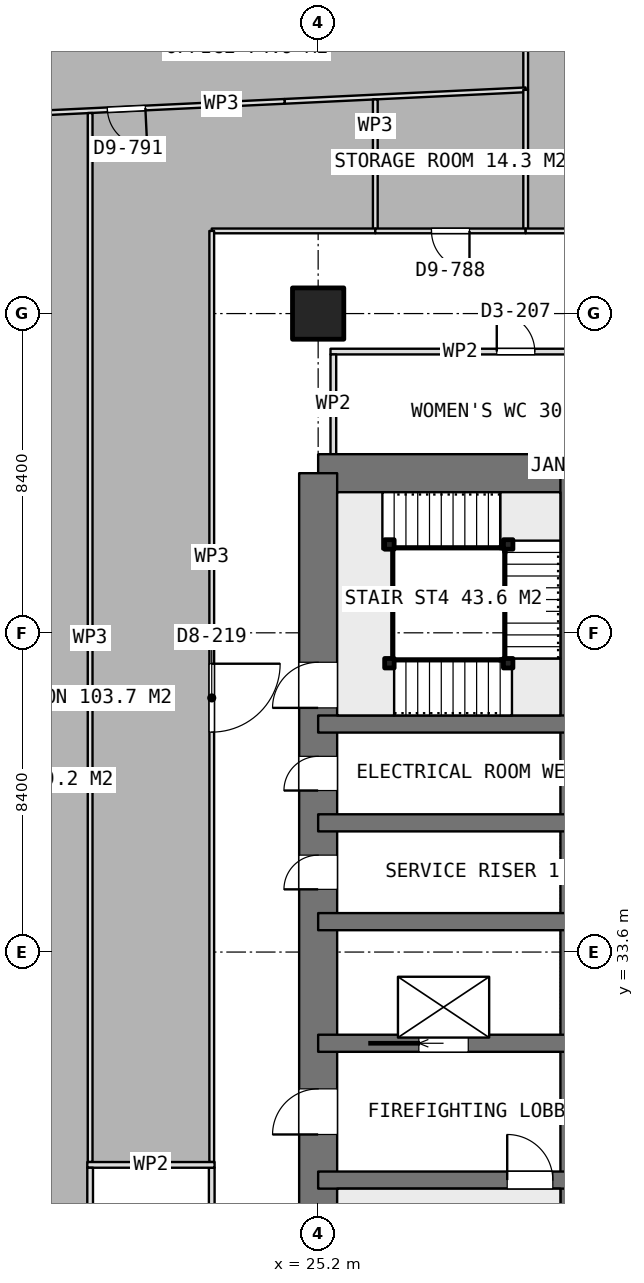
"""IFC4 building model, lengths in metres.
Left out: names, types, materials, properties, quantities, classifications, styles, units other than length and angle.
Written with IfcOpenShell. Run it as: python <this file> out.ifc"""

import sys

from ifc_helpers import new_model, si_unit, direction, frame, frame_2d, origin, origin_2d, place, context, subcontext, project, spatial, rectangle, extrude, element, fill, save


model = new_model("IFC4")
c1 = context("Model", 3, precision=1e-05, world=origin(), true_north=direction((0.0, 1.0)))
c2 = subcontext(c1, "Body", "Model", "MODEL_VIEW")
j1 = project(units=[si_unit("LENGTHUNIT", "METRE"), si_unit("PLANEANGLEUNIT", "RADIAN")], contexts=[c1])
p1 = place(None, origin())
s1 = spatial("IfcSite", under=j1, at=p1, CompositionType="ELEMENT")
p2 = place(p1, origin())
s2 = spatial("IfcBuilding", under=s1, at=p2, CompositionType="ELEMENT")
p3 = place(p2, frame((0.0, 0.0, 195.2)))
s3 = spatial("IfcBuildingStorey", under=s2, at=p3, CompositionType="ELEMENT", Elevation=195.2)
p4 = place(p3, frame((25.2, 46.2, 0.0), z_axis=(0.0, 0.0, 1.0), x_axis=(1.0, 0.0, 0.0)))
e1 = element("IfcWall", 1, at=p4, inside=s3, PredefinedType="SHEAR", context=c2, shape_type="SweptSolid", body=[
    extrude(rectangle(XDim=10.4, YDim=1.0, at=frame_2d((5.2, 0.0))), origin(), (0.0, 0.0, 1.0), 3.75),
])
p5 = place(p3, frame((25.2, 21.0, 0.0), z_axis=(0.0, 0.0, 1.0), x_axis=(0.0, 1.0, 0.0)))
e2 = element("IfcWall", 2, at=p5, inside=s3, PredefinedType="SHEAR", context=c2, shape_type="SweptSolid", body=[
    extrude(rectangle(XDim=25.2, YDim=1.0, at=frame_2d((12.6, 0.0))), origin(), (0.0, 0.0, 1.0), 3.75),
])
p6 = place(p5, frame((7.8, 0.0, 0.0)))
e3 = element("IfcOpeningElement", 3, at=p6, cuts=e2, PredefinedType="OPENING", context=c2, shape_type="SweptSolid", body=[
    extrude(rectangle(XDim=1.2, YDim=2.1, at=frame_2d((0.6, 1.05))), frame((0.0, 0.51, 0.0), z_axis=(0.0, -1.0, 0.0), x_axis=(1.0, 0.0, 0.0)), (0.0, 0.0, 1.0), 1.02),
])
p7 = place(p5, frame((14.25, 0.0, 0.0)))
e4 = element("IfcOpeningElement", 4, at=p7, cuts=e2, PredefinedType="OPENING", context=c2, shape_type="SweptSolid", body=[
    extrude(rectangle(XDim=0.9, YDim=2.1, at=frame_2d((0.45, 1.05))), frame((0.0, 0.51, 0.0), z_axis=(0.0, -1.0, 0.0), x_axis=(1.0, 0.0, 0.0)), (0.0, 0.0, 1.0), 1.02),
])
p8 = place(p5, frame((16.85, 0.0, 0.0)))
e5 = element("IfcOpeningElement", 5, at=p8, cuts=e2, PredefinedType="OPENING", context=c2, shape_type="SweptSolid", body=[
    extrude(rectangle(XDim=0.9, YDim=2.1, at=frame_2d((0.45, 1.05))), frame((0.0, 0.51, 0.0), z_axis=(0.0, -1.0, 0.0), x_axis=(1.0, 0.0, 0.0)), (0.0, 0.0, 1.0), 1.02),
])
p9 = place(p5, frame((19.025, 0.0, 0.0)))
e6 = element("IfcOpeningElement", 6, at=p9, cuts=e2, PredefinedType="OPENING", context=c2, shape_type="SweptSolid", body=[
    extrude(rectangle(XDim=1.2, YDim=2.1, at=frame_2d((0.6, 1.05))), frame((0.0, 0.51, 0.0), z_axis=(0.0, -1.0, 0.0), x_axis=(1.0, 0.0, 0.0)), (0.0, 0.0, 1.0), 1.02),
])
p10 = place(p3, frame((31.8, 21.0, 0.0), z_axis=(0.0, 0.0, 1.0), x_axis=(0.0, 1.0, 0.0)))
e7 = element("IfcWall", 7, at=p10, inside=s3, PredefinedType="SHEAR", context=c2, shape_type="SweptSolid", body=[
    extrude(rectangle(XDim=25.2, YDim=0.45, at=frame_2d((12.6, 0.0))), origin(), (0.0, 0.0, 1.0), 3.75),
])
p11 = place(p3, frame((25.2, 27.6, 0.0), z_axis=(0.0, 0.0, 1.0), x_axis=(1.0, 0.0, 0.0)))
e8 = element("IfcWall", 8, at=p11, inside=s3, PredefinedType="SHEAR", context=c2, shape_type="SweptSolid", body=[
    extrude(rectangle(XDim=6.6, YDim=0.45, at=frame_2d((3.3, 0.0))), origin(), (0.0, 0.0, 1.0), 3.75),
])
p12 = place(p11, frame((4.975, 0.0, 0.0)))
e9 = element("IfcOpeningElement", 9, at=p12, cuts=e8, PredefinedType="OPENING", context=c2, shape_type="SweptSolid", body=[
    extrude(rectangle(XDim=1.2, YDim=2.1, at=frame_2d((0.6, 1.05))), frame((0.0, 0.235, 0.0), z_axis=(0.0, -1.0, 0.0), x_axis=(1.0, 0.0, 0.0)), (0.0, 0.0, 1.0), 0.47),
])
p13 = place(p3, frame((25.2, 31.2, 0.0), z_axis=(0.0, 0.0, 1.0), x_axis=(1.0, 0.0, 0.0)))
e10 = element("IfcWall", 10, at=p13, inside=s3, PredefinedType="SHEAR", context=c2, shape_type="SweptSolid", body=[
    extrude(rectangle(XDim=6.6, YDim=0.45, at=frame_2d((3.3, 0.0))), origin(), (0.0, 0.0, 1.0), 3.75),
])
p14 = place(p13, frame((2.65, 0.0, 0.0)))
e11 = element("IfcOpeningElement", 11, at=p14, cuts=e10, PredefinedType="OPENING", context=c2, shape_type="SweptSolid", body=[
    extrude(rectangle(XDim=1.3, YDim=2.1, at=frame_2d((0.65, 1.05))), frame((0.0, 0.235, 0.0), z_axis=(0.0, -1.0, 0.0), x_axis=(1.0, 0.0, 0.0)), (0.0, 0.0, 1.0), 0.47),
])
for number, where, z_axis, x_axis in (
    (12, (25.2, 34.4, 0.0), (0.0, 0.0, 1.0), (1.0, 0.0, 0.0)),
    (13, (25.2, 37.0, 0.0), (0.0, 0.0, 1.0), (1.0, 0.0, 0.0)),
    (14, (25.2, 39.6, 0.0), (0.0, 0.0, 1.0), (1.0, 0.0, 0.0)),
):
    element("IfcWall", number, at=place(p3, frame(where, z_axis=z_axis, x_axis=x_axis)), inside=s3, PredefinedType="SHEAR", context=c2, shape_type="SweptSolid", body=[
        extrude(rectangle(XDim=6.6, YDim=0.45, at=frame_2d((3.3, 0.0))), origin(), (0.0, 0.0, 1.0), 3.75),
    ])
p15 = place(p3, frame((25.2, 50.4, 0.0), z_axis=(0.0, 0.0, 1.0), x_axis=(1.0, 0.0, 0.0)))
e15 = element("IfcColumn", 15, at=p15, inside=s3, PredefinedType="COLUMN", context=c2, shape_type="SweptSolid", body=[
    extrude(rectangle(XDim=1.35, YDim=1.35, at=origin_2d()), origin(), (0.0, 0.0, 1.0), 3.75),
])
p16 = place(p3, frame((25.525, 49.4, 0.0), z_axis=(0.0, 0.0, 1.0), x_axis=(1.0, 0.0, 0.0)))
e16 = element("IfcWall", 16, at=p16, inside=s3, PredefinedType="PARTITIONING", context=c2, shape_type="SweptSolid", body=[
    extrude(rectangle(XDim=9.75, YDim=0.15, at=frame_2d((4.875, 0.0))), origin(), (0.0, 0.0, 1.0), 3.5),
])
p17 = place(p16, frame((4.375, 0.0, 0.0)))
e17 = element("IfcOpeningElement", 17, at=p17, cuts=e16, PredefinedType="OPENING", context=c2, shape_type="SweptSolid", body=[
    extrude(rectangle(XDim=1.0, YDim=2.1, at=frame_2d((0.5, 1.05))), frame((0.0, 0.085, 0.0), z_axis=(0.0, -1.0, 0.0), x_axis=(1.0, 0.0, 0.0)), (0.0, 0.0, 1.0), 0.17),
])
p18 = place(p3, frame((25.6, 46.7, 0.0), z_axis=(0.0, 0.0, 1.0), x_axis=(0.0, 1.0, 0.0)))
e18 = element("IfcWall", 18, at=p18, inside=s3, PredefinedType="PARTITIONING", context=c2, shape_type="SweptSolid", body=[
    extrude(rectangle(XDim=2.625, YDim=0.15, at=frame_2d((1.312, 0.0))), origin(), (0.0, 0.0, 1.0), 3.5),
])
p19 = place(p3, frame((19.125, 28.0, 0.0), z_axis=(0.0, 0.0, 1.0), x_axis=(1.0, 0.0, 0.0)))
e19 = element("IfcWall", 19, at=p19, inside=s3, PredefinedType="PARTITIONING", context=c2, shape_type="SweptSolid", body=[
    extrude(rectangle(XDim=3.35, YDim=0.15, at=frame_2d((1.675, 0.0))), origin(), (0.0, 0.0, 1.0), 3.5),
])
p20 = place(p3, frame((19.2, 21.075, 0.0), z_axis=(0.0, 0.0, 1.0), x_axis=(0.0, 1.0, 0.0)))
e20 = element("IfcWall", 20, at=p20, inside=s3, PredefinedType="PARTITIONING", context=c2, shape_type="SweptSolid", body=[
    extrude(rectangle(XDim=6.85, YDim=0.15, at=frame_2d((3.425, 0.0))), origin(), (0.0, 0.0, 1.0), 3.5),
])
p21 = place(p3, frame((22.4, 21.075, 0.0), z_axis=(0.0, 0.0, 1.0), x_axis=(0.0, 1.0, 0.0)))
e21 = element("IfcWall", 21, at=p21, inside=s3, PredefinedType="PARTITIONING", context=c2, shape_type="SweptSolid", body=[
    extrude(rectangle(XDim=6.85, YDim=0.15, at=frame_2d((3.425, 0.0))), origin(), (0.0, 0.0, 1.0), 3.5),
])
p22 = place(p21, frame((2.925, 0.0, 0.0)))
e22 = element("IfcOpeningElement", 22, at=p22, cuts=e21, PredefinedType="OPENING", context=c2, shape_type="SweptSolid", body=[
    extrude(rectangle(XDim=1.0, YDim=2.1, at=frame_2d((0.5, 1.05))), frame((0.0, 0.085, 0.0), z_axis=(0.0, -1.0, 0.0), x_axis=(1.0, 0.0, 0.0)), (0.0, 0.0, 1.0), 0.17),
])
p23 = place(p3, frame((30.661, 61.313, 0.0), z_axis=(0.0, 0.0, 1.0), x_axis=(0.0, -1.0, 0.0)))
e23 = element("IfcWall", 23, at=p23, inside=s3, PredefinedType="PARTITIONING", context=c2, shape_type="SweptSolid", body=[
    extrude(rectangle(XDim=5.026, YDim=0.125, at=frame_2d((2.513, 0.0))), origin(), (0.0, 0.0, 1.0), 3.5),
])
p24 = place(p3, frame((30.661, 56.287, 0.0), z_axis=(0.0, 0.0, 1.0), x_axis=(-0.998859247907, -0.047751469819, 0.0)))
e24 = element("IfcWall", 24, at=p24, inside=s3, PredefinedType="PARTITIONING", context=c2, shape_type="SweptSolid", body=[
    extrude(rectangle(XDim=6.35, YDim=0.125, at=frame_2d((3.175, 0.0))), origin(), (0.0, 0.0, 1.0), 3.5),
])
p25 = place(p3, frame((24.317, 55.984, 0.0), z_axis=(0.0, 0.0, 1.0), x_axis=(-0.998859973319, -0.047736293327, 0.0)))
e25 = element("IfcWall", 25, at=p25, inside=s3, PredefinedType="PARTITIONING", context=c2, shape_type="SweptSolid", body=[
    extrude(rectangle(XDim=8.336, YDim=0.125, at=frame_2d((4.168, 0.0))), origin(), (0.0, 0.0, 1.0), 3.5),
])
p26 = place(p25, frame((3.668, 0.0, 0.0)))
e26 = element("IfcOpeningElement", 26, at=p26, cuts=e25, PredefinedType="OPENING", context=c2, shape_type="SweptSolid", body=[
    extrude(rectangle(XDim=1.0, YDim=2.1, at=frame_2d((0.5, 1.05))), frame((0.0, 0.073, 0.0), z_axis=(0.0, -1.0, 0.0), x_axis=(1.0, 0.0, 0.0)), (0.0, 0.0, 1.0), 0.145),
])
p27 = place(p3, frame((26.704, 56.035, 0.0), z_axis=(0.0, 0.0, 1.0), x_axis=(0.0, -1.0, 0.0)))
e27 = element("IfcWall", 27, at=p27, inside=s3, PredefinedType="PARTITIONING", context=c2, shape_type="SweptSolid", body=[
    extrude(rectangle(XDim=3.46, YDim=0.125, at=frame_2d((1.73, 0.0))), origin(), (0.0, 0.0, 1.0), 3.5),
])
p28 = place(p3, frame((26.704, 52.575, 0.0), z_axis=(0.0, 0.0, 1.0), x_axis=(-1.0, 0.0, 0.0)))
e28 = element("IfcWall", 28, at=p28, inside=s3, PredefinedType="PARTITIONING", context=c2, shape_type="SweptSolid", body=[
    extrude(rectangle(XDim=4.304, YDim=0.125, at=frame_2d((2.152, 0.0))), origin(), (0.0, 0.0, 1.0), 3.5),
])
p29 = place(p3, frame((22.4, 52.575, 0.0), z_axis=(0.0, 0.0, 1.0), x_axis=(0.0, -1.0, 0.0)))
e29 = element("IfcWall", 29, at=p29, inside=s3, PredefinedType="PARTITIONING", context=c2, shape_type="SweptSolid", body=[
    extrude(rectangle(XDim=24.5, YDim=0.125, at=frame_2d((12.25, 0.0))), origin(), (0.0, 0.0, 1.0), 3.5),
])
p30 = place(p29, frame((11.388, 0.0, 0.0)))
e30 = element("IfcOpeningElement", 30, at=p30, cuts=e29, PredefinedType="OPENING", context=c2, shape_type="SweptSolid", body=[
    extrude(rectangle(XDim=1.8, YDim=2.1, at=frame_2d((0.9, 1.05))), frame((0.0, 0.073, 0.0), z_axis=(0.0, -1.0, 0.0), x_axis=(1.0, 0.0, 0.0)), (0.0, 0.0, 1.0), 0.145),
])
p31 = place(p3, frame((19.2, 28.075, 0.0), z_axis=(0.0, 0.0, 1.0), x_axis=(0.0, 1.0, 0.0)))
e31 = element("IfcWall", 31, at=p31, inside=s3, PredefinedType="PARTITIONING", context=c2, shape_type="SweptSolid", body=[
    extrude(rectangle(XDim=27.602, YDim=0.125, at=frame_2d((13.801, 0.0))), origin(), (0.0, 0.0, 1.0), 3.5),
])
p32 = place(p3, frame((30.661, 56.287, 0.0), z_axis=(0.0, 0.0, 1.0), x_axis=(0.0, -1.0, 0.0)))
e32 = element("IfcWall", 32, at=p32, inside=s3, PredefinedType="PARTITIONING", context=c2, shape_type="SweptSolid", body=[
    extrude(rectangle(XDim=3.712, YDim=0.125, at=frame_2d((1.856, 0.0))), origin(), (0.0, 0.0, 1.0), 3.5),
])
p33 = place(p3, frame((30.661, 52.575, 0.0), z_axis=(0.0, 0.0, 1.0), x_axis=(-1.0, 0.0, 0.0)))
e33 = element("IfcWall", 33, at=p33, inside=s3, PredefinedType="PARTITIONING", context=c2, shape_type="SweptSolid", body=[
    extrude(rectangle(XDim=3.957, YDim=0.125, at=frame_2d((1.979, 0.0))), origin(), (0.0, 0.0, 1.0), 3.5),
])
p34 = place(p33, frame((1.479, 0.0, 0.0)))
e34 = element("IfcOpeningElement", 34, at=p34, cuts=e33, PredefinedType="OPENING", context=c2, shape_type="SweptSolid", body=[
    extrude(rectangle(XDim=1.0, YDim=2.1, at=frame_2d((0.5, 1.05))), frame((0.0, 0.073, 0.0), z_axis=(0.0, -1.0, 0.0), x_axis=(1.0, 0.0, 0.0)), (0.0, 0.0, 1.0), 0.145),
])
p35 = place(p3, frame((38.57, 52.575, 0.0), z_axis=(0.0, 0.0, 1.0), x_axis=(-1.0, 0.0, 0.0)))
e35 = element("IfcWall", 35, at=p35, inside=s3, PredefinedType="PARTITIONING", context=c2, shape_type="SweptSolid", body=[
    extrude(rectangle(XDim=7.909, YDim=0.125, at=frame_2d((3.955, 0.0))), origin(), (0.0, 0.0, 1.0), 3.5),
])
p36 = place(p35, frame((3.455, 0.0, 0.0)))
e36 = element("IfcOpeningElement", 36, at=p36, cuts=e35, PredefinedType="OPENING", context=c2, shape_type="SweptSolid", body=[
    extrude(rectangle(XDim=1.0, YDim=2.1, at=frame_2d((0.5, 1.05))), frame((0.0, 0.073, 0.0), z_axis=(0.0, -1.0, 0.0), x_axis=(1.0, 0.0, 0.0)), (0.0, 0.0, 1.0), 0.145),
])
for number, where, z_axis, x_axis in (
    (37, (27.075, 41.2, 0.0), (0.0, 0.0, 1.0), (1.0, 0.0, 0.0)),
    (38, (30.2, 41.2, 0.0), (0.0, 0.0, 1.0), (1.0, 0.0, 0.0)),
    (39, (30.2, 44.325, 0.0), (0.0, 0.0, 1.0), (1.0, 0.0, 0.0)),
    (40, (27.075, 44.325, 0.0), (0.0, 0.0, 1.0), (1.0, 0.0, 0.0)),
):
    element("IfcColumn", number, at=place(p3, frame(where, z_axis=z_axis, x_axis=x_axis)), inside=s3, PredefinedType="COLUMN", context=c2, shape_type="SweptSolid", body=[
        extrude(rectangle(XDim=0.25, YDim=0.25, at=origin_2d()), origin(), (0.0, 0.0, 1.0), 3.75),
    ])
p37 = place(p6, origin())
e41 = element("IfcDoor", 41, at=p37, inside=s3, OperationType="SINGLE_SWING_LEFT", PredefinedType="DOOR", context=c2, shape_type="SweptSolid", body=[
    extrude(rectangle(XDim=1.2, YDim=2.1, at=frame_2d((0.6, 1.05))), frame((0.0, 0.025, 0.0), z_axis=(0.0, -1.0, 0.0), x_axis=(1.0, 0.0, 0.0)), (0.0, 0.0, 1.0), 0.05),
])
fill(e3, e41)
p38 = place(p7, origin())
e42 = element("IfcDoor", 42, at=p38, inside=s3, OperationType="SINGLE_SWING_LEFT", PredefinedType="DOOR", context=c2, shape_type="SweptSolid", body=[
    extrude(rectangle(XDim=0.9, YDim=2.1, at=frame_2d((0.45, 1.05))), frame((0.0, 0.025, 0.0), z_axis=(0.0, -1.0, 0.0), x_axis=(1.0, 0.0, 0.0)), (0.0, 0.0, 1.0), 0.05),
])
fill(e4, e42)
p39 = place(p8, origin())
e43 = element("IfcDoor", 43, at=p39, inside=s3, OperationType="SINGLE_SWING_LEFT", PredefinedType="DOOR", context=c2, shape_type="SweptSolid", body=[
    extrude(rectangle(XDim=0.9, YDim=2.1, at=frame_2d((0.45, 1.05))), frame((0.0, 0.025, 0.0), z_axis=(0.0, -1.0, 0.0), x_axis=(1.0, 0.0, 0.0)), (0.0, 0.0, 1.0), 0.05),
])
fill(e5, e43)
p40 = place(p14, origin())
e44 = element("IfcDoor", 44, at=p40, inside=s3, OperationType="SLIDING_TO_LEFT", PredefinedType="USERDEFINED", context=c2, shape_type="SweptSolid", body=[
    extrude(rectangle(XDim=1.3, YDim=2.1, at=frame_2d((0.65, 1.05))), frame((0.0, 0.025, 0.0), z_axis=(0.0, -1.0, 0.0), x_axis=(1.0, 0.0, 0.0)), (0.0, 0.0, 1.0), 0.05),
])
fill(e11, e44)
p41 = place(p17, origin())
e45 = element("IfcDoor", 45, at=p41, inside=s3, OperationType="SINGLE_SWING_LEFT", PredefinedType="DOOR", context=c2, shape_type="SweptSolid", body=[
    extrude(rectangle(XDim=1.0, YDim=2.1, at=frame_2d((0.5, 1.05))), frame((0.0, 0.025, 0.0), z_axis=(0.0, -1.0, 0.0), x_axis=(1.0, 0.0, 0.0)), (0.0, 0.0, 1.0), 0.05),
])
fill(e17, e45)
p42 = place(p30, origin())
e46 = element("IfcDoor", 46, at=p42, inside=s3, OperationType="DOUBLE_DOOR_SINGLE_SWING", PredefinedType="DOOR", context=c2, shape_type="SweptSolid", body=[
    extrude(rectangle(XDim=1.8, YDim=2.1, at=frame_2d((0.9, 1.05))), frame((0.0, 0.025, 0.0), z_axis=(0.0, -1.0, 0.0), x_axis=(1.0, 0.0, 0.0)), (0.0, 0.0, 1.0), 0.05),
])
fill(e30, e46)
p43 = place(p34, origin())
e47 = element("IfcDoor", 47, at=p43, inside=s3, OperationType="SINGLE_SWING_LEFT", PredefinedType="DOOR", context=c2, shape_type="SweptSolid", body=[
    extrude(rectangle(XDim=1.0, YDim=2.1, at=frame_2d((0.5, 1.05))), frame((0.0, 0.025, 0.0), z_axis=(0.0, -1.0, 0.0), x_axis=(1.0, 0.0, 0.0)), (0.0, 0.0, 1.0), 0.05),
])
fill(e34, e47)
p44 = place(p26, origin())
e48 = element("IfcDoor", 48, at=p44, inside=s3, OperationType="SINGLE_SWING_LEFT", PredefinedType="DOOR", context=c2, shape_type="SweptSolid", body=[
    extrude(rectangle(XDim=1.0, YDim=2.1, at=frame_2d((0.5, 1.05))), frame((0.0, 0.025, 0.0), z_axis=(0.0, -1.0, 0.0), x_axis=(1.0, 0.0, 0.0)), (0.0, 0.0, 1.0), 0.05),
])
fill(e26, e48)
p45 = place(p12, origin())
e49 = element("IfcDoor", 49, at=p45, inside=s3, OperationType="SINGLE_SWING_RIGHT", PredefinedType="DOOR", context=c2, shape_type="SweptSolid", body=[
    extrude(rectangle(XDim=1.2, YDim=2.1, at=frame_2d((0.6, 1.05))), frame((0.0, 0.025, 0.0), z_axis=(0.0, -1.0, 0.0), x_axis=(1.0, 0.0, 0.0)), (0.0, 0.0, 1.0), 0.05),
])
fill(e9, e49)
p46 = place(p9, origin())
e50 = element("IfcDoor", 50, at=p46, inside=s3, OperationType="SINGLE_SWING_RIGHT", PredefinedType="DOOR", context=c2, shape_type="SweptSolid", body=[
    extrude(rectangle(XDim=1.2, YDim=2.1, at=frame_2d((0.6, 1.05))), frame((0.0, 0.025, 0.0), z_axis=(0.0, -1.0, 0.0), x_axis=(1.0, 0.0, 0.0)), (0.0, 0.0, 1.0), 0.05),
])
fill(e6, e50)
save(model, sys.argv[1])
